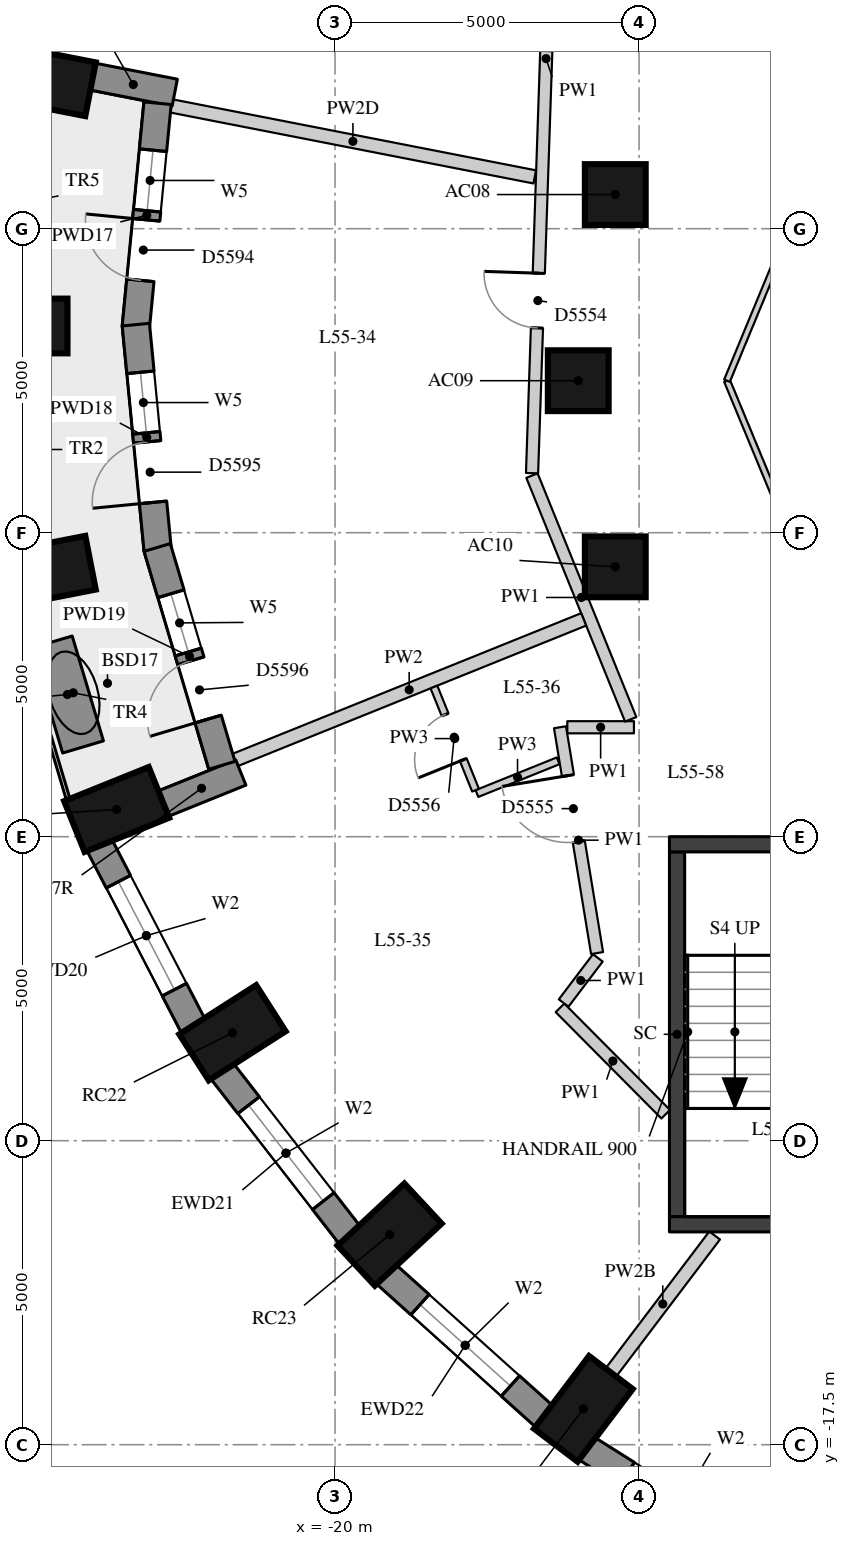
"""IFC4 building model, lengths in metres.
Left out: names, types, materials, properties, quantities, classifications, styles, units other than length and angle.
Written with IfcOpenShell. Run it as: python <this file> out.ifc"""

import sys

from ifc_helpers import new_model, si_unit, direction, frame, frame_2d, origin, origin_2d, place, context, subcontext, project, spatial, rectangle, extrude, element, fill, save


model = new_model("IFC4")
c1 = context("Model", 3, precision=1e-05, world=origin(), true_north=direction((0.0, 1.0)))
c2 = subcontext(c1, "Body", "Model", "MODEL_VIEW")
j1 = project(units=[si_unit("LENGTHUNIT", "METRE"), si_unit("PLANEANGLEUNIT", "RADIAN")], contexts=[c1])
p1 = place(None, origin())
s1 = spatial("IfcSite", under=j1, at=p1, CompositionType="ELEMENT")
p2 = place(p1, origin())
s2 = spatial("IfcBuilding", under=s1, at=p2, CompositionType="ELEMENT")
p3 = place(p2, frame((0.0, 0.0, 195.8)))
s3 = spatial("IfcBuildingStorey", under=s2, at=p3, CompositionType="ELEMENT", Elevation=195.8)
for number, where, z_axis, x_axis in (
    (1, (-24.757, 4.937, 0.0), (0.0, 0.0, 1.0), (-0.981, 0.192, 0.0)),
    (2, (-25.15, 0.9, 0.0), (0.0, 0.0, 1.0), (-1.0, 0.0, 0.0)),
    (3, (-24.757, -3.137, 0.0), (0.0, 0.0, 1.0), (-0.981, -0.192, 0.0)),
    (4, (-23.591, -7.052, 0.0), (0.0, 0.0, 1.0), (-0.927, -0.374, 0.0)),
    (5, (-21.687, -10.725, 0.0), (0.0, 0.0, 1.0), (-0.842, -0.539, 0.0)),
    (6, (-19.102, -14.045, 0.0), (0.0, 0.0, 1.0), (-0.732, -0.681, 0.0)),
    (7, (-15.916, -16.911, 0.0), (0.0, 0.0, 1.0), (-0.604, -0.797, 0.0)),
):
    element("IfcColumn", number, at=place(p3, frame(where, z_axis=z_axis, x_axis=x_axis)), inside=s3, PredefinedType="COLUMN", context=c2, shape_type="SweptSolid", body=[
        extrude(rectangle(XDim=1.5, YDim=0.9, at=origin_2d()), origin(), (0.0, 0.0, 1.0), 3.3),
    ])
for number, where, z_axis, x_axis in (
    (8, (-15.391, 3.062, 0.0), (0.0, 0.0, 1.0), (1.0, 0.0, 0.0)),
    (9, (-16.0, 0.0, 0.0), (0.0, 0.0, 1.0), (1.0, 0.0, 0.0)),
    (10, (-15.391, -3.062, 0.0), (0.0, 0.0, 1.0), (1.0, 0.0, 0.0)),
):
    element("IfcColumn", number, at=place(p3, frame(where, z_axis=z_axis, x_axis=x_axis)), inside=s3, PredefinedType="COLUMN", context=c2, shape_type="SweptSolid", body=[
        extrude(rectangle(XDim=1.0, YDim=1.0, at=origin_2d()), origin(), (0.0, 0.0, 1.0), 3.3),
    ])
p4 = place(p3, frame((-24.2, 8.634, 0.0), z_axis=(0.0, 0.0, 1.0), x_axis=(-0.285444972963, -0.958395099847, 0.0)))
e11 = element("IfcWall", 11, at=p4, inside=s3, PredefinedType="SOLIDWALL", context=c2, shape_type="SweptSolid", body=[
    extrude(rectangle(XDim=3.32, YDim=0.45, at=frame_2d((1.66, 0.0))), origin(), (0.0, 0.0, 1.0), 3.02),
])
p5 = place(p4, frame((0.66, 0.0, 0.4)))
e12 = element("IfcOpeningElement", 12, at=p5, cuts=e11, PredefinedType="OPENING", context=c2, shape_type="SweptSolid", body=[
    extrude(rectangle(XDim=2.0, YDim=1.75, at=frame_2d((1.0, 0.875))), frame((0.0, 0.235, 0.0), z_axis=(0.0, -1.0, 0.0), x_axis=(1.0, 0.0, 0.0)), (0.0, 0.0, 1.0), 0.47),
])
p6 = place(p3, frame((-23.878, -7.632, 0.0), z_axis=(0.0, 0.0, 1.0), x_axis=(0.460232593174, -0.887798378113, 0.0)))
e13 = element("IfcWall", 13, at=p6, inside=s3, PredefinedType="SOLIDWALL", context=c2, shape_type="SweptSolid", body=[
    extrude(rectangle(XDim=3.371, YDim=0.45, at=frame_2d((1.685, 0.0))), origin(), (0.0, 0.0, 1.0), 3.02),
])
p7 = place(p6, frame((0.685, 0.0, 0.4)))
e14 = element("IfcOpeningElement", 14, at=p7, cuts=e13, PredefinedType="OPENING", context=c2, shape_type="SweptSolid", body=[
    extrude(rectangle(XDim=2.0, YDim=1.75, at=frame_2d((1.0, 0.875))), frame((0.0, 0.235, 0.0), z_axis=(0.0, -1.0, 0.0), x_axis=(1.0, 0.0, 0.0)), (0.0, 0.0, 1.0), 0.47),
])
p8 = place(p3, frame((-21.863, -11.348, 0.0), z_axis=(0.0, 0.0, 1.0), x_axis=(0.614255239631, -0.789107407509, 0.0)))
e15 = element("IfcWall", 15, at=p8, inside=s3, PredefinedType="SOLIDWALL", context=c2, shape_type="SweptSolid", body=[
    extrude(rectangle(XDim=3.438, YDim=0.45, at=frame_2d((1.719, 0.0))), origin(), (0.0, 0.0, 1.0), 3.02),
])
p9 = place(p8, frame((0.719, 0.0, 0.4)))
e16 = element("IfcOpeningElement", 16, at=p9, cuts=e15, PredefinedType="OPENING", context=c2, shape_type="SweptSolid", body=[
    extrude(rectangle(XDim=2.0, YDim=1.75, at=frame_2d((1.0, 0.875))), frame((0.0, 0.235, 0.0), z_axis=(0.0, -1.0, 0.0), x_axis=(1.0, 0.0, 0.0)), (0.0, 0.0, 1.0), 0.47),
])
p10 = place(p3, frame((-19.165, -14.69, 0.0), z_axis=(0.0, 0.0, 1.0), x_axis=(0.743442727602, -0.668799604348, 0.0)))
e17 = element("IfcWall", 17, at=p10, inside=s3, PredefinedType="SOLIDWALL", context=c2, shape_type="SweptSolid", body=[
    extrude(rectangle(XDim=3.513, YDim=0.45, at=frame_2d((1.756, 0.0))), origin(), (0.0, 0.0, 1.0), 3.02),
])
p11 = place(p10, frame((0.756, 0.0, 0.4)))
e18 = element("IfcOpeningElement", 18, at=p11, cuts=e17, PredefinedType="OPENING", context=c2, shape_type="SweptSolid", body=[
    extrude(rectangle(XDim=2.0, YDim=1.75, at=frame_2d((1.0, 0.875))), frame((0.0, 0.235, 0.0), z_axis=(0.0, -1.0, 0.0), x_axis=(1.0, 0.0, 0.0)), (0.0, 0.0, 1.0), 0.47),
])
p12 = place(p3, frame((-15.867, -17.559, 0.0), z_axis=(0.0, 0.0, 1.0), x_axis=(0.84616917791, -0.532914366813, 0.0)))
e19 = element("IfcWall", 19, at=p12, inside=s3, PredefinedType="SOLIDWALL", context=c2, shape_type="SweptSolid", body=[
    extrude(rectangle(XDim=3.587, YDim=0.45, at=frame_2d((1.793, 0.0))), origin(), (0.0, 0.0, 1.0), 3.02),
])
p13 = place(p12, frame((0.793, 0.0, 0.4)))
e20 = element("IfcOpeningElement", 20, at=p13, cuts=e19, PredefinedType="OPENING", context=c2, shape_type="SweptSolid", body=[
    extrude(rectangle(XDim=2.0, YDim=1.75, at=frame_2d((1.0, 0.875))), frame((0.0, 0.235, 0.0), z_axis=(0.0, -1.0, 0.0), x_axis=(1.0, 0.0, 0.0)), (0.0, 0.0, 1.0), 0.47),
])
p14 = place(p3, frame((-24.0, 5.005, 0.0), z_axis=(0.0, 0.0, 1.0), x_axis=(0.981402725872, -0.191960125157, 0.0)))
e21 = element("IfcWall", 21, at=p14, inside=s3, PredefinedType="SOLIDWALL", context=c2, shape_type="SweptSolid", body=[
    extrude(rectangle(XDim=1.39, YDim=0.45, at=frame_2d((0.695, 0.0))), origin(), (0.0, 0.0, 1.0), 2.47),
])
p15 = place(p3, frame((-22.84, -6.964, 0.0), z_axis=(0.0, 0.0, 1.0), x_axis=(0.92737073954, 0.374143704271, 0.0)))
e22 = element("IfcWall", 22, at=p15, inside=s3, PredefinedType="SOLIDWALL", context=c2, shape_type="SweptSolid", body=[
    extrude(rectangle(XDim=1.391, YDim=0.45, at=frame_2d((0.695, 0.0))), origin(), (0.0, 0.0, 1.0), 3.02),
])
p16 = place(p3, frame((-22.919, 4.564, 0.0), z_axis=(0.0, 0.0, 1.0), x_axis=(-0.096520145037, -0.995331031166, 0.0)))
e23 = element("IfcWall", 23, at=p16, inside=s3, PredefinedType="SOLIDWALL", context=c2, shape_type="SweptSolid", body=[
    extrude(rectangle(XDim=3.703, YDim=0.45, at=frame_2d((1.852, 0.0))), origin(), (0.0, 0.0, 1.0), 3.02),
])
p17 = place(p16, frame((0.776, 0.0, 0.4)))
e24 = element("IfcOpeningElement", 24, at=p17, cuts=e23, PredefinedType="OPENING", context=c2, shape_type="SweptSolid", body=[
    extrude(rectangle(XDim=1.0, YDim=1.75, at=frame_2d((0.5, 0.875))), frame((0.0, 0.235, 0.0), z_axis=(0.0, -1.0, 0.0), x_axis=(1.0, 0.0, 0.0)), (0.0, 0.0, 1.0), 0.47),
])
p18 = place(p16, frame((1.927, 0.0, 0.0)))
e25 = element("IfcOpeningElement", 25, at=p18, cuts=e23, PredefinedType="OPENING", context=c2, shape_type="SweptSolid", body=[
    extrude(rectangle(XDim=1.0, YDim=2.15, at=frame_2d((0.5, 1.075))), frame((0.0, 0.235, 0.0), z_axis=(0.0, -1.0, 0.0), x_axis=(1.0, 0.0, 0.0)), (0.0, 0.0, 1.0), 0.47),
])
p19 = place(p3, frame((-23.276, 0.922, 0.0), z_axis=(0.0, 0.0, 1.0), x_axis=(0.096556729592, -0.995327482777, 0.0)))
e26 = element("IfcWall", 26, at=p19, inside=s3, PredefinedType="SOLIDWALL", context=c2, shape_type="SweptSolid", body=[
    extrude(rectangle(XDim=3.724, YDim=0.45, at=frame_2d((1.862, 0.0))), origin(), (0.0, 0.0, 1.0), 3.02),
])
p20 = place(p19, frame((0.787, 0.0, 0.4)))
e27 = element("IfcOpeningElement", 27, at=p20, cuts=e26, PredefinedType="OPENING", context=c2, shape_type="SweptSolid", body=[
    extrude(rectangle(XDim=1.0, YDim=1.75, at=frame_2d((0.5, 0.875))), frame((0.0, 0.235, 0.0), z_axis=(0.0, -1.0, 0.0), x_axis=(1.0, 0.0, 0.0)), (0.0, 0.0, 1.0), 0.47),
])
p21 = place(p19, frame((1.937, 0.0, 0.0)))
e28 = element("IfcOpeningElement", 28, at=p21, cuts=e26, PredefinedType="OPENING", context=c2, shape_type="SweptSolid", body=[
    extrude(rectangle(XDim=1.0, YDim=2.15, at=frame_2d((0.5, 1.075))), frame((0.0, 0.235, 0.0), z_axis=(0.0, -1.0, 0.0), x_axis=(1.0, 0.0, 0.0)), (0.0, 0.0, 1.0), 0.47),
])
p22 = place(p3, frame((-22.925, -2.743, 0.0), z_axis=(0.0, 0.0, 1.0), x_axis=(0.284722093158, -0.958610103049, 0.0)))
e29 = element("IfcWall", 29, at=p22, inside=s3, PredefinedType="SOLIDWALL", context=c2, shape_type="SweptSolid", body=[
    extrude(rectangle(XDim=3.738, YDim=0.45, at=frame_2d((1.869, 0.0))), origin(), (0.0, 0.0, 1.0), 3.02),
])
p23 = place(p22, frame((0.794, 0.0, 0.4)))
e30 = element("IfcOpeningElement", 30, at=p23, cuts=e29, PredefinedType="OPENING", context=c2, shape_type="SweptSolid", body=[
    extrude(rectangle(XDim=1.0, YDim=1.75, at=frame_2d((0.5, 0.875))), frame((0.0, 0.235, 0.0), z_axis=(0.0, -1.0, 0.0), x_axis=(1.0, 0.0, 0.0)), (0.0, 0.0, 1.0), 0.47),
])
p24 = place(p22, frame((1.944, 0.0, 0.0)))
e31 = element("IfcOpeningElement", 31, at=p24, cuts=e29, PredefinedType="OPENING", context=c2, shape_type="SweptSolid", body=[
    extrude(rectangle(XDim=1.0, YDim=2.15, at=frame_2d((0.5, 1.075))), frame((0.0, 0.235, 0.0), z_axis=(0.0, -1.0, 0.0), x_axis=(1.0, 0.0, 0.0)), (0.0, 0.0, 1.0), 0.47),
])
p25 = place(p3, frame((-24.658, -4.299, 0.0), z_axis=(0.0, 0.0, 1.0), x_axis=(0.285505743157, -0.958376998171, 0.0)))
e32 = element("IfcWall", 32, at=p25, inside=s3, PredefinedType="USERDEFINED", context=c2, shape_type="SweptSolid", body=[
    extrude(rectangle(XDim=1.8, YDim=0.7, at=frame_2d((0.9, 0.0))), origin(), (0.0, 0.0, 1.0), 0.75),
])
p26 = place(p3, frame((-14.375, -13.75, -0.28), z_axis=(0.0, 0.0, 1.0), x_axis=(0.0, 1.0, 0.0)))
e33 = element("IfcWall", 33, at=p26, inside=s3, PredefinedType="SHEAR", context=c2, shape_type="SweptSolid", body=[
    extrude(rectangle(XDim=6.0, YDim=0.25, at=frame_2d((3.0, 0.0))), origin(), (0.0, 0.0, 1.0), 3.3),
])
for number, where, z_axis, x_axis in (
    (34, (-14.5, -7.625, -0.28), (0.0, 0.0, 1.0), (1.0, 0.0, 0.0)),
    (35, (-14.5, -13.875, -0.28), (0.0, 0.0, 1.0), (1.0, 0.0, 0.0)),
):
    element("IfcWall", number, at=place(p3, frame(where, z_axis=z_axis, x_axis=x_axis)), inside=s3, PredefinedType="SHEAR", context=c2, shape_type="SweptSolid", body=[
        extrude(rectangle(XDim=5.2, YDim=0.25, at=frame_2d((2.6, 0.0))), origin(), (0.0, 0.0, 1.0), 3.3),
    ])
p27 = place(p3, frame((-14.562, -12.064, 0.0), z_axis=(0.0, 0.0, 1.0), x_axis=(-0.704826289083, 0.709379942074, 0.0)))
e36 = element("IfcWall", 36, at=p27, inside=s3, PredefinedType="PARTITIONING", context=c2, shape_type="SweptSolid", body=[
    extrude(rectangle(XDim=2.466, YDim=0.2, at=frame_2d((1.233, 0.0))), origin(), (0.0, 0.0, 1.0), 3.02),
])
p28 = place(p3, frame((-16.24, -10.236, 0.0), z_axis=(0.0, 0.0, 1.0), x_axis=(0.60389301212, 0.797065386222, 0.0)))
e37 = element("IfcWall", 37, at=p28, inside=s3, PredefinedType="PARTITIONING", context=c2, shape_type="SweptSolid", body=[
    extrude(rectangle(XDim=0.931, YDim=0.2, at=frame_2d((0.466, 0.0))), origin(), (0.0, 0.0, 1.0), 3.02),
])
p29 = place(p3, frame((-15.69, -9.414, 0.0), z_axis=(0.0, 0.0, 1.0), x_axis=(-0.161968669214, 0.986795900981, 0.0)))
e38 = element("IfcWall", 38, at=p29, inside=s3, PredefinedType="PARTITIONING", context=c2, shape_type="SweptSolid", body=[
    extrude(rectangle(XDim=3.764, YDim=0.2, at=frame_2d((1.882, 0.0))), origin(), (0.0, 0.0, 1.0), 3.02),
])
p30 = place(p29, frame((1.858, 0.0, 0.0)))
e39 = element("IfcOpeningElement", 39, at=p30, cuts=e38, PredefinedType="OPENING", context=c2, shape_type="SweptSolid", body=[
    extrude(rectangle(XDim=1.1, YDim=2.1, at=frame_2d((0.55, 1.05))), frame((0.0, 0.11, 0.0), z_axis=(0.0, -1.0, 0.0), x_axis=(1.0, 0.0, 0.0)), (0.0, 0.0, 1.0), 0.22),
])
p31 = place(p3, frame((-16.18, -5.7, 0.0), z_axis=(0.0, 0.0, 1.0), x_axis=(1.0, 0.0, 0.0)))
e40 = element("IfcWall", 40, at=p31, inside=s3, PredefinedType="PARTITIONING", context=c2, shape_type="SweptSolid", body=[
    extrude(rectangle(XDim=1.096, YDim=0.2, at=frame_2d((0.548, 0.0))), origin(), (0.0, 0.0, 1.0), 3.02),
])
p32 = place(p3, frame((-15.137, -5.57, 0.0), z_axis=(0.0, 0.0, 1.0), x_axis=(-0.375464059939, 0.926836954213, 0.0)))
e41 = element("IfcWall", 41, at=p32, inside=s3, PredefinedType="PARTITIONING", context=c2, shape_type="SweptSolid", body=[
    extrude(rectangle(XDim=4.326, YDim=0.2, at=frame_2d((2.163, 0.0))), origin(), (0.0, 0.0, 1.0), 3.02),
])
p33 = place(p3, frame((-16.76, -1.521, 0.0), z_axis=(0.0, 0.0, 1.0), x_axis=(0.033695560079, 0.999432143385, 0.0)))
e42 = element("IfcWall", 42, at=p33, inside=s3, PredefinedType="PARTITIONING", context=c2, shape_type="SweptSolid", body=[
    extrude(rectangle(XDim=13.643, YDim=0.2, at=frame_2d((6.822, 0.0))), origin(), (0.0, 0.0, 1.0), 3.02),
])
p34 = place(p33, frame((11.489, 0.0, 0.0)))
e43 = element("IfcOpeningElement", 43, at=p34, cuts=e42, PredefinedType="OPENING", context=c2, shape_type="SweptSolid", body=[
    extrude(rectangle(XDim=0.9, YDim=2.1, at=frame_2d((0.45, 1.05))), frame((0.0, 0.11, 0.0), z_axis=(0.0, -1.0, 0.0), x_axis=(1.0, 0.0, 0.0)), (0.0, 0.0, 1.0), 0.22),
])
p35 = place(p33, frame((6.954, 0.0, 0.0)))
e44 = element("IfcOpeningElement", 44, at=p35, cuts=e42, PredefinedType="OPENING", context=c2, shape_type="SweptSolid", body=[
    extrude(rectangle(XDim=1.1, YDim=2.1, at=frame_2d((0.55, 1.05))), frame((0.0, 0.11, 0.0), z_axis=(0.0, -1.0, 0.0), x_axis=(1.0, 0.0, 0.0)), (0.0, 0.0, 1.0), 0.22),
])
p36 = place(p33, frame((2.39, 0.0, 0.0)))
e45 = element("IfcOpeningElement", 45, at=p36, cuts=e42, PredefinedType="OPENING", context=c2, shape_type="SweptSolid", body=[
    extrude(rectangle(XDim=0.9, YDim=2.1, at=frame_2d((0.45, 1.05))), frame((0.0, 0.11, 0.0), z_axis=(0.0, -1.0, 0.0), x_axis=(1.0, 0.0, 0.0)), (0.0, 0.0, 1.0), 0.22),
])
p37 = place(p3, frame((-22.697, 4.521, 0.0), z_axis=(0.0, 0.0, 1.0), x_axis=(0.981441525081, -0.19176165635, 0.0)))
e46 = element("IfcWall", 46, at=p37, inside=s3, PredefinedType="PARTITIONING", context=c2, shape_type="SweptSolid", body=[
    extrude(rectangle(XDim=6.094, YDim=0.22, at=frame_2d((3.047, 0.0))), origin(), (0.0, 0.0, 1.0), 2.47),
])
p38 = place(p3, frame((-21.651, -6.241, 0.0), z_axis=(0.0, 0.0, 1.0), x_axis=(0.927381885483, 0.374116076208, 0.0)))
e47 = element("IfcWall", 47, at=p38, inside=s3, PredefinedType="PARTITIONING", context=c2, shape_type="SweptSolid", body=[
    extrude(rectangle(XDim=6.19, YDim=0.22, at=frame_2d((3.095, 0.0))), origin(), (0.0, 0.0, 1.0), 3.02),
])
p39 = place(p3, frame((-15.463, -16.312, 0.0), z_axis=(0.0, 0.0, 1.0), x_axis=(0.603613294085, 0.797277236101, 0.0)))
e48 = element("IfcWall", 48, at=p39, inside=s3, PredefinedType="PARTITIONING", context=c2, shape_type="SweptSolid", body=[
    extrude(rectangle(XDim=2.828, YDim=0.22, at=frame_2d((1.414, 0.0))), origin(), (0.0, 0.0, 1.0), 2.57),
])
p40 = place(p3, frame((-16.331, -6.252, 0.0), z_axis=(0.0, 0.0, 1.0), x_axis=(-0.927409233125, -0.374048278053, 0.0)))
e49 = element("IfcWall", 49, at=p40, inside=s3, PredefinedType="PARTITIONING", context=c2, shape_type="SweptSolid", body=[
    extrude(rectangle(XDim=1.44, YDim=0.12, at=frame_2d((0.72, 0.0))), origin(), (0.0, 0.0, 1.0), 3.02),
])
p41 = place(p3, frame((-17.689, -6.735, 0.0), z_axis=(0.0, 0.0, 1.0), x_axis=(-0.374057168462, 0.927405647342, 0.0)))
e50 = element("IfcWall", 50, at=p41, inside=s3, PredefinedType="PARTITIONING", context=c2, shape_type="SweptSolid", body=[
    extrude(rectangle(XDim=1.83, YDim=0.12, at=frame_2d((0.915, 0.0))), origin(), (0.0, 0.0, 1.0), 3.02),
])
p42 = place(p41, frame((0.54, 0.0, 0.0)))
e51 = element("IfcOpeningElement", 51, at=p42, cuts=e50, PredefinedType="OPENING", context=c2, shape_type="SweptSolid", body=[
    extrude(rectangle(XDim=0.8, YDim=2.1, at=frame_2d((0.4, 1.05))), frame((0.0, 0.07, 0.0), z_axis=(0.0, -1.0, 0.0), x_axis=(1.0, 0.0, 0.0)), (0.0, 0.0, 1.0), 0.14),
])
for number, where, z_axis, x_axis in (
    (52, (-11.927, -3.927, 0.0), (0.0, 0.0, 1.0), (-0.383, 0.924, 0.0)),
    (53, (-13.554, 0.0, 0.0), (0.0, 0.0, 1.0), (0.383, 0.924, 0.0)),
):
    element("IfcWall", number, at=place(p3, frame(where, z_axis=z_axis, x_axis=x_axis)), inside=s3, PredefinedType="PARTITIONING", context=c2, shape_type="SweptSolid", body=[
        extrude(rectangle(XDim=4.251, YDim=0.1, at=frame_2d((2.125, 0.0))), origin(), (0.0, 0.0, 1.0), 3.02),
    ])
p43 = place(p7, origin())
e54 = element("IfcWindow", 54, at=p43, inside=s3, PartitioningType="SINGLE_PANEL", PredefinedType="WINDOW", context=c2, shape_type="SweptSolid", body=[
    extrude(rectangle(XDim=2.0, YDim=1.75, at=frame_2d((1.0, 0.875))), frame((0.0, 0.035, 0.0), z_axis=(0.0, -1.0, 0.0), x_axis=(1.0, 0.0, 0.0)), (0.0, 0.0, 1.0), 0.06),
])
fill(e14, e54)
p44 = place(p9, origin())
e55 = element("IfcWindow", 55, at=p44, inside=s3, PartitioningType="SINGLE_PANEL", PredefinedType="WINDOW", context=c2, shape_type="SweptSolid", body=[
    extrude(rectangle(XDim=2.0, YDim=1.75, at=frame_2d((1.0, 0.875))), frame((0.0, 0.035, 0.0), z_axis=(0.0, -1.0, 0.0), x_axis=(1.0, 0.0, 0.0)), (0.0, 0.0, 1.0), 0.06),
])
fill(e16, e55)
p45 = place(p11, origin())
e56 = element("IfcWindow", 56, at=p45, inside=s3, PartitioningType="SINGLE_PANEL", PredefinedType="WINDOW", context=c2, shape_type="SweptSolid", body=[
    extrude(rectangle(XDim=2.0, YDim=1.75, at=frame_2d((1.0, 0.875))), frame((0.0, 0.035, 0.0), z_axis=(0.0, -1.0, 0.0), x_axis=(1.0, 0.0, 0.0)), (0.0, 0.0, 1.0), 0.06),
])
fill(e18, e56)
p46 = place(p17, origin())
e57 = element("IfcWindow", 57, at=p46, inside=s3, PartitioningType="SINGLE_PANEL", PredefinedType="WINDOW", context=c2, shape_type="SweptSolid", body=[
    extrude(rectangle(XDim=1.0, YDim=1.75, at=frame_2d((0.5, 0.875))), frame((0.0, 0.035, 0.0), z_axis=(0.0, -1.0, 0.0), x_axis=(1.0, 0.0, 0.0)), (0.0, 0.0, 1.0), 0.06),
])
fill(e24, e57)
p47 = place(p18, frame((1.0, 0.0, 0.0), z_axis=(0.0, 0.0, 1.0), x_axis=(-1.0, 0.0, 0.0)))
e58 = element("IfcDoor", 58, at=p47, inside=s3, OperationType="SINGLE_SWING_RIGHT", PredefinedType="DOOR", context=c2, shape_type="SweptSolid", body=[
    extrude(rectangle(XDim=1.0, YDim=2.15, at=frame_2d((0.5, 1.075))), frame((0.0, 0.075, 0.0), z_axis=(0.0, -1.0, 0.0), x_axis=(1.0, 0.0, 0.0)), (0.0, 0.0, 1.0), 0.05),
])
fill(e25, e58)
p48 = place(p20, origin())
e59 = element("IfcWindow", 59, at=p48, inside=s3, PartitioningType="SINGLE_PANEL", PredefinedType="WINDOW", context=c2, shape_type="SweptSolid", body=[
    extrude(rectangle(XDim=1.0, YDim=1.75, at=frame_2d((0.5, 0.875))), frame((0.0, 0.035, 0.0), z_axis=(0.0, -1.0, 0.0), x_axis=(1.0, 0.0, 0.0)), (0.0, 0.0, 1.0), 0.06),
])
fill(e27, e59)
p49 = place(p21, frame((1.0, 0.0, 0.0), z_axis=(0.0, 0.0, 1.0), x_axis=(-1.0, 0.0, 0.0)))
e60 = element("IfcDoor", 60, at=p49, inside=s3, OperationType="SINGLE_SWING_LEFT", PredefinedType="DOOR", context=c2, shape_type="SweptSolid", body=[
    extrude(rectangle(XDim=1.0, YDim=2.15, at=frame_2d((0.5, 1.075))), frame((0.0, 0.075, 0.0), z_axis=(0.0, -1.0, 0.0), x_axis=(1.0, 0.0, 0.0)), (0.0, 0.0, 1.0), 0.05),
])
fill(e28, e60)
p50 = place(p23, origin())
e61 = element("IfcWindow", 61, at=p50, inside=s3, PartitioningType="SINGLE_PANEL", PredefinedType="WINDOW", context=c2, shape_type="SweptSolid", body=[
    extrude(rectangle(XDim=1.0, YDim=1.75, at=frame_2d((0.5, 0.875))), frame((0.0, 0.035, 0.0), z_axis=(0.0, -1.0, 0.0), x_axis=(1.0, 0.0, 0.0)), (0.0, 0.0, 1.0), 0.06),
])
fill(e30, e61)
p51 = place(p24, frame((1.0, 0.0, 0.0), z_axis=(0.0, 0.0, 1.0), x_axis=(-1.0, 0.0, 0.0)))
e62 = element("IfcDoor", 62, at=p51, inside=s3, OperationType="SINGLE_SWING_LEFT", PredefinedType="DOOR", context=c2, shape_type="SweptSolid", body=[
    extrude(rectangle(XDim=1.0, YDim=2.15, at=frame_2d((0.5, 1.075))), frame((0.0, 0.075, 0.0), z_axis=(0.0, -1.0, 0.0), x_axis=(1.0, 0.0, 0.0)), (0.0, 0.0, 1.0), 0.05),
])
fill(e31, e62)
p52 = place(p36, origin())
e63 = element("IfcDoor", 63, at=p52, inside=s3, OperationType="SINGLE_SWING_RIGHT", PredefinedType="DOOR", context=c2, shape_type="SweptSolid", body=[
    extrude(rectangle(XDim=0.9, YDim=2.1, at=frame_2d((0.45, 1.05))), frame((0.0, 0.025, 0.0), z_axis=(0.0, -1.0, 0.0), x_axis=(1.0, 0.0, 0.0)), (0.0, 0.0, 1.0), 0.05),
])
fill(e45, e63)
p53 = place(p30, origin())
e64 = element("IfcDoor", 64, at=p53, inside=s3, OperationType="SINGLE_SWING_RIGHT", PredefinedType="DOOR", context=c2, shape_type="SweptSolid", body=[
    extrude(rectangle(XDim=1.1, YDim=2.1, at=frame_2d((0.55, 1.05))), frame((0.0, 0.025, 0.0), z_axis=(0.0, -1.0, 0.0), x_axis=(1.0, 0.0, 0.0)), (0.0, 0.0, 1.0), 0.05),
])
fill(e39, e64)
p54 = place(p42, origin())
e65 = element("IfcDoor", 65, at=p54, inside=s3, OperationType="SINGLE_SWING_LEFT", PredefinedType="DOOR", context=c2, shape_type="SweptSolid", body=[
    extrude(rectangle(XDim=0.8, YDim=2.1, at=frame_2d((0.4, 1.05))), frame((0.0, 0.025, 0.0), z_axis=(0.0, -1.0, 0.0), x_axis=(1.0, 0.0, 0.0)), (0.0, 0.0, 1.0), 0.05),
])
fill(e51, e65)
save(model, sys.argv[1])
